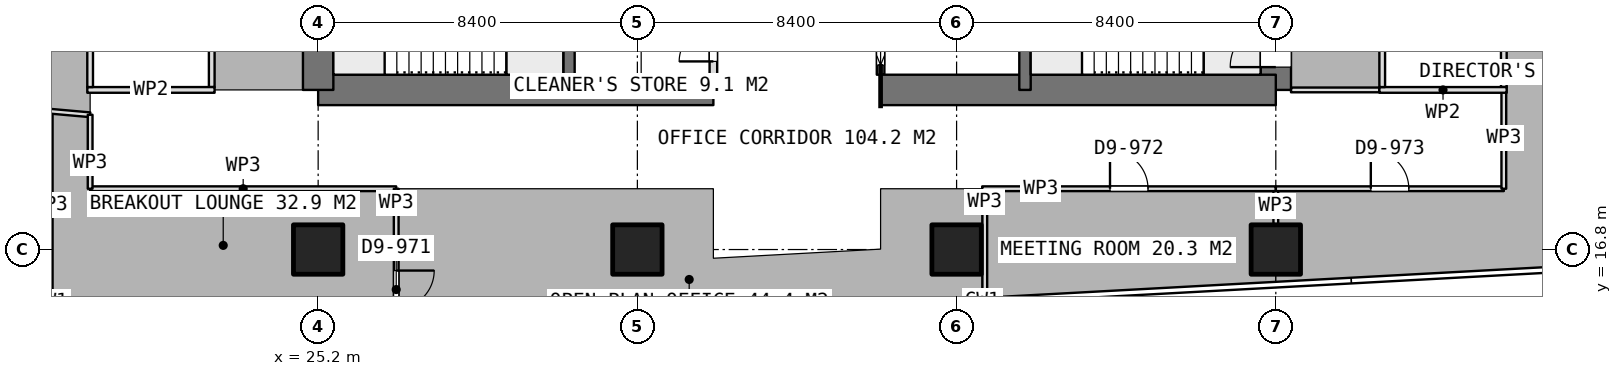
"""IFC4 building model, lengths in metres.
Left out: names, types, materials, properties, quantities, classifications, styles, units other than length and angle.
Written with IfcOpenShell. Run it as: python <this file> out.ifc"""

import sys

from ifc_helpers import new_model, si_unit, direction, frame, frame_2d, origin, origin_2d, place, context, subcontext, project, spatial, rectangle, extrude, element, fill, save


model = new_model("IFC4")
c1 = context("Model", 3, precision=1e-05, world=origin(), true_north=direction((0.0, 1.0)))
c2 = subcontext(c1, "Body", "Model", "MODEL_VIEW")
j1 = project(units=[si_unit("LENGTHUNIT", "METRE"), si_unit("PLANEANGLEUNIT", "RADIAN")], contexts=[c1])
p1 = place(None, origin())
s1 = spatial("IfcSite", under=j1, at=p1, CompositionType="ELEMENT")
p2 = place(p1, origin())
s2 = spatial("IfcBuilding", under=s1, at=p2, CompositionType="ELEMENT")
p3 = place(p2, frame((0.0, 0.0, 261.35)))
s3 = spatial("IfcBuildingStorey", under=s2, at=p3, CompositionType="ELEMENT", Elevation=261.35)
p4 = place(p3, frame((25.2, 21.0, 0.0), z_axis=(0.0, 0.0, 1.0), x_axis=(1.0, 0.0, 0.0)))
e1 = element("IfcWall", 1, at=p4, inside=s3, PredefinedType="SHEAR", context=c2, shape_type="SweptSolid", body=[
    extrude(rectangle(XDim=10.4, YDim=0.8, at=frame_2d((5.2, 0.0))), origin(), (0.0, 0.0, 1.0), 3.75),
])
p5 = place(p3, frame((40.0, 21.0, 0.0), z_axis=(0.0, 0.0, 1.0), x_axis=(1.0, 0.0, 0.0)))
e2 = element("IfcWall", 2, at=p5, inside=s3, PredefinedType="SHEAR", context=c2, shape_type="SweptSolid", body=[
    extrude(rectangle(XDim=10.4, YDim=0.8, at=frame_2d((5.2, 0.0))), origin(), (0.0, 0.0, 1.0), 3.75),
])
p6 = place(p3, frame((25.2, 21.0, 0.0), z_axis=(0.0, 0.0, 1.0), x_axis=(0.0, 1.0, 0.0)))
e3 = element("IfcWall", 3, at=p6, inside=s3, PredefinedType="SHEAR", context=c2, shape_type="SweptSolid", body=[
    extrude(rectangle(XDim=25.2, YDim=0.8, at=frame_2d((12.6, 0.0))), origin(), (0.0, 0.0, 1.0), 3.75),
])
p7 = place(p6, frame((7.8, 0.0, 0.0)))
e4 = element("IfcOpeningElement", 4, at=p7, cuts=e3, PredefinedType="OPENING", context=c2, shape_type="SweptSolid", body=[
    extrude(rectangle(XDim=1.2, YDim=2.1, at=frame_2d((0.6, 1.05))), frame((0.0, 0.41, 0.0), z_axis=(0.0, -1.0, 0.0), x_axis=(1.0, 0.0, 0.0)), (0.0, 0.0, 1.0), 0.82),
])
p8 = place(p6, frame((14.25, 0.0, 0.0)))
e5 = element("IfcOpeningElement", 5, at=p8, cuts=e3, PredefinedType="OPENING", context=c2, shape_type="SweptSolid", body=[
    extrude(rectangle(XDim=0.9, YDim=2.1, at=frame_2d((0.45, 1.05))), frame((0.0, 0.41, 0.0), z_axis=(0.0, -1.0, 0.0), x_axis=(1.0, 0.0, 0.0)), (0.0, 0.0, 1.0), 0.82),
])
p9 = place(p6, frame((16.85, 0.0, 0.0)))
e6 = element("IfcOpeningElement", 6, at=p9, cuts=e3, PredefinedType="OPENING", context=c2, shape_type="SweptSolid", body=[
    extrude(rectangle(XDim=0.9, YDim=2.1, at=frame_2d((0.45, 1.05))), frame((0.0, 0.41, 0.0), z_axis=(0.0, -1.0, 0.0), x_axis=(1.0, 0.0, 0.0)), (0.0, 0.0, 1.0), 0.82),
])
p10 = place(p6, frame((18.95, 0.0, 0.0)))
e7 = element("IfcOpeningElement", 7, at=p10, cuts=e3, PredefinedType="OPENING", context=c2, shape_type="SweptSolid", body=[
    extrude(rectangle(XDim=1.2, YDim=2.1, at=frame_2d((0.6, 1.05))), frame((0.0, 0.41, 0.0), z_axis=(0.0, -1.0, 0.0), x_axis=(1.0, 0.0, 0.0)), (0.0, 0.0, 1.0), 0.82),
])
p11 = place(p3, frame((50.4, 21.0, 0.0), z_axis=(0.0, 0.0, 1.0), x_axis=(0.0, 1.0, 0.0)))
e8 = element("IfcWall", 8, at=p11, inside=s3, PredefinedType="SHEAR", context=c2, shape_type="SweptSolid", body=[
    extrude(rectangle(XDim=25.2, YDim=0.8, at=frame_2d((12.6, 0.0))), origin(), (0.0, 0.0, 1.0), 3.75),
])
p12 = place(p11, frame((16.2, 0.0, 0.0)))
e9 = element("IfcOpeningElement", 9, at=p12, cuts=e8, PredefinedType="OPENING", context=c2, shape_type="SweptSolid", body=[
    extrude(rectangle(XDim=1.2, YDim=2.1, at=frame_2d((0.6, 1.05))), frame((0.0, 0.41, 0.0), z_axis=(0.0, -1.0, 0.0), x_axis=(1.0, 0.0, 0.0)), (0.0, 0.0, 1.0), 0.82),
])
p13 = place(p11, frame((10.05, 0.0, 0.0)))
e10 = element("IfcOpeningElement", 10, at=p13, cuts=e8, PredefinedType="OPENING", context=c2, shape_type="SweptSolid", body=[
    extrude(rectangle(XDim=0.9, YDim=2.1, at=frame_2d((0.45, 1.05))), frame((0.0, 0.41, 0.0), z_axis=(0.0, -1.0, 0.0), x_axis=(1.0, 0.0, 0.0)), (0.0, 0.0, 1.0), 0.82),
])
p14 = place(p11, frame((7.45, 0.0, 0.0)))
e11 = element("IfcOpeningElement", 11, at=p14, cuts=e8, PredefinedType="OPENING", context=c2, shape_type="SweptSolid", body=[
    extrude(rectangle(XDim=0.9, YDim=2.1, at=frame_2d((0.45, 1.05))), frame((0.0, 0.41, 0.0), z_axis=(0.0, -1.0, 0.0), x_axis=(1.0, 0.0, 0.0)), (0.0, 0.0, 1.0), 0.82),
])
p15 = place(p11, frame((0.6, 0.0, 0.0)))
e12 = element("IfcOpeningElement", 12, at=p15, cuts=e8, PredefinedType="OPENING", context=c2, shape_type="SweptSolid", body=[
    extrude(rectangle(XDim=1.2, YDim=2.1, at=frame_2d((0.6, 1.05))), frame((0.0, 0.41, 0.0), z_axis=(0.0, -1.0, 0.0), x_axis=(1.0, 0.0, 0.0)), (0.0, 0.0, 1.0), 0.82),
])
for number, where, z_axis, x_axis in (
    (13, (31.8, 21.0, 0.0), (0.0, 0.0, 1.0), (0.0, 1.0, 0.0)),
    (14, (43.8, 21.0, 0.0), (0.0, 0.0, 1.0), (0.0, 1.0, 0.0)),
):
    element("IfcWall", number, at=place(p3, frame(where, z_axis=z_axis, x_axis=x_axis)), inside=s3, PredefinedType="SHEAR", context=c2, shape_type="SweptSolid", body=[
        extrude(rectangle(XDim=25.2, YDim=0.3, at=frame_2d((12.6, 0.0))), origin(), (0.0, 0.0, 1.0), 3.75),
    ])
for number, where, z_axis, x_axis in (
    (15, (25.2, 16.8, 0.0), (0.0, 0.0, 1.0), (1.0, 0.0, 0.0)),
    (16, (33.6, 16.8, 0.0), (0.0, 0.0, 1.0), (1.0, 0.0, 0.0)),
    (17, (42.0, 16.8, 0.0), (0.0, 0.0, 1.0), (1.0, 0.0, 0.0)),
    (18, (50.4, 16.8, 0.0), (0.0, 0.0, 1.0), (1.0, 0.0, 0.0)),
):
    element("IfcColumn", number, at=place(p3, frame(where, z_axis=z_axis, x_axis=x_axis)), inside=s3, PredefinedType="COLUMN", context=c2, shape_type="SweptSolid", body=[
        extrude(rectangle(XDim=1.3, YDim=1.3, at=origin_2d()), origin(), (0.0, 0.0, 1.0), 3.75),
    ])
p16 = place(p3, frame((40.0, 21.4, 0.0), z_axis=(0.0, 0.0, 1.0), x_axis=(0.0, 1.0, 0.0)))
e19 = element("IfcWall", 19, at=p16, inside=s3, PredefinedType="PARTITIONING", context=c2, shape_type="SweptSolid", body=[
    extrude(rectangle(XDim=1.85, YDim=0.2, at=frame_2d((0.925, 0.0))), origin(), (0.0, 0.0, 1.0), 3.5),
])
p17 = place(p16, frame((0.25, 0.0, 0.0)))
e20 = element("IfcOpeningElement", 20, at=p17, cuts=e19, PredefinedType="OPENING", context=c2, shape_type="SweptSolid", body=[
    extrude(rectangle(XDim=1.1, YDim=2.1, at=frame_2d((0.55, 1.05))), frame((0.0, 0.11, 0.0), z_axis=(0.0, -1.0, 0.0), x_axis=(1.0, 0.0, 0.0)), (0.0, 0.0, 1.0), 0.22),
])
p18 = place(p3, frame((35.6, 21.4, 0.0), z_axis=(0.0, 0.0, 1.0), x_axis=(0.0, 1.0, 0.0)))
e21 = element("IfcWall", 21, at=p18, inside=s3, PredefinedType="PARTITIONING", context=c2, shape_type="SweptSolid", body=[
    extrude(rectangle(XDim=1.85, YDim=0.2, at=frame_2d((0.925, 0.0))), origin(), (0.0, 0.0, 1.0), 3.5),
])
p19 = place(p18, frame((0.35, 0.0, 0.0)))
e22 = element("IfcOpeningElement", 22, at=p19, cuts=e21, PredefinedType="OPENING", context=c2, shape_type="SweptSolid", body=[
    extrude(rectangle(XDim=0.9, YDim=2.1, at=frame_2d((0.45, 1.05))), frame((0.0, 0.11, 0.0), z_axis=(0.0, -1.0, 0.0), x_axis=(1.0, 0.0, 0.0)), (0.0, 0.0, 1.0), 0.22),
])
p20 = place(p3, frame((19.125, 21.0, 0.0), z_axis=(0.0, 0.0, 1.0), x_axis=(1.0, 0.0, 0.0)))
e23 = element("IfcWall", 23, at=p20, inside=s3, PredefinedType="PARTITIONING", context=c2, shape_type="SweptSolid", body=[
    extrude(rectangle(XDim=3.35, YDim=0.15, at=frame_2d((1.675, 0.0))), origin(), (0.0, 0.0, 1.0), 3.5),
])
p21 = place(p3, frame((19.2, 21.075, 0.0), z_axis=(0.0, 0.0, 1.0), x_axis=(0.0, 1.0, 0.0)))
e24 = element("IfcWall", 24, at=p21, inside=s3, PredefinedType="PARTITIONING", context=c2, shape_type="SweptSolid", body=[
    extrude(rectangle(XDim=6.85, YDim=0.15, at=frame_2d((3.425, 0.0))), origin(), (0.0, 0.0, 1.0), 3.5),
])
p22 = place(p3, frame((22.4, 21.075, 0.0), z_axis=(0.0, 0.0, 1.0), x_axis=(0.0, 1.0, 0.0)))
e25 = element("IfcWall", 25, at=p22, inside=s3, PredefinedType="PARTITIONING", context=c2, shape_type="SweptSolid", body=[
    extrude(rectangle(XDim=6.85, YDim=0.15, at=frame_2d((3.425, 0.0))), origin(), (0.0, 0.0, 1.0), 3.5),
])
p23 = place(p22, frame((2.925, 0.0, 0.0)))
e26 = element("IfcOpeningElement", 26, at=p23, cuts=e25, PredefinedType="OPENING", context=c2, shape_type="SweptSolid", body=[
    extrude(rectangle(XDim=1.0, YDim=2.1, at=frame_2d((0.5, 1.05))), frame((0.0, 0.085, 0.0), z_axis=(0.0, -1.0, 0.0), x_axis=(1.0, 0.0, 0.0)), (0.0, 0.0, 1.0), 0.17),
])
p24 = place(p3, frame((53.125, 21.0, 0.0), z_axis=(0.0, 0.0, 1.0), x_axis=(1.0, 0.0, 0.0)))
e27 = element("IfcWall", 27, at=p24, inside=s3, PredefinedType="PARTITIONING", context=c2, shape_type="SweptSolid", body=[
    extrude(rectangle(XDim=3.35, YDim=0.15, at=frame_2d((1.675, 0.0))), origin(), (0.0, 0.0, 1.0), 3.5),
])
p25 = place(p3, frame((53.2, 21.075, 0.0), z_axis=(0.0, 0.0, 1.0), x_axis=(0.0, 1.0, 0.0)))
e28 = element("IfcWall", 28, at=p25, inside=s3, PredefinedType="PARTITIONING", context=c2, shape_type="SweptSolid", body=[
    extrude(rectangle(XDim=6.85, YDim=0.15, at=frame_2d((3.425, 0.0))), origin(), (0.0, 0.0, 1.0), 3.5),
])
p26 = place(p25, frame((2.925, 0.0, 0.0)))
e29 = element("IfcOpeningElement", 29, at=p26, cuts=e28, PredefinedType="OPENING", context=c2, shape_type="SweptSolid", body=[
    extrude(rectangle(XDim=1.0, YDim=2.1, at=frame_2d((0.5, 1.05))), frame((0.0, 0.085, 0.0), z_axis=(0.0, -1.0, 0.0), x_axis=(1.0, 0.0, 0.0)), (0.0, 0.0, 1.0), 0.17),
])
p27 = place(p3, frame((56.4, 21.075, 0.0), z_axis=(0.0, 0.0, 1.0), x_axis=(0.0, 1.0, 0.0)))
e30 = element("IfcWall", 30, at=p27, inside=s3, PredefinedType="PARTITIONING", context=c2, shape_type="SweptSolid", body=[
    extrude(rectangle(XDim=6.85, YDim=0.15, at=frame_2d((3.425, 0.0))), origin(), (0.0, 0.0, 1.0), 3.5),
])
p28 = place(p3, frame((50.4, 18.4, 0.0), z_axis=(0.0, 0.0, 1.0), x_axis=(0.0, -1.0, 0.0)))
e31 = element("IfcWall", 31, at=p28, inside=s3, PredefinedType="PARTITIONING", context=c2, shape_type="SweptSolid", body=[
    extrude(rectangle(XDim=0.93, YDim=0.125, at=frame_2d((0.465, 0.0))), origin(), (0.0, 0.0, 1.0), 3.5),
])
p29 = place(p3, frame((42.742, 15.538, 0.0), z_axis=(0.0, 0.0, 1.0), x_axis=(0.0, 1.0, 0.0)))
e32 = element("IfcWall", 32, at=p29, inside=s3, PredefinedType="PARTITIONING", context=c2, shape_type="SweptSolid", body=[
    extrude(rectangle(XDim=2.799, YDim=0.125, at=frame_2d((1.399, 0.0))), origin(), (0.0, 0.0, 1.0), 3.5),
])
p30 = place(p3, frame((42.674, 18.4, 0.0), z_axis=(0.0, 0.0, 1.0), x_axis=(1.0, 0.0, 0.0)))
e33 = element("IfcWall", 33, at=p30, inside=s3, PredefinedType="PARTITIONING", context=c2, shape_type="SweptSolid", body=[
    extrude(rectangle(XDim=7.726, YDim=0.125, at=frame_2d((3.863, 0.0))), origin(), (0.0, 0.0, 1.0), 3.5),
])
p31 = place(p30, frame((3.363, 0.0, 0.0)))
e34 = element("IfcOpeningElement", 34, at=p31, cuts=e33, PredefinedType="OPENING", context=c2, shape_type="SweptSolid", body=[
    extrude(rectangle(XDim=1.0, YDim=2.1, at=frame_2d((0.5, 1.05))), frame((0.0, 0.073, 0.0), z_axis=(0.0, -1.0, 0.0), x_axis=(1.0, 0.0, 0.0)), (0.0, 0.0, 1.0), 0.145),
])
p32 = place(p3, frame((50.401, 18.4, 0.0), z_axis=(0.0, 0.0, 1.0), x_axis=(1.0, 0.0, 0.0)))
e35 = element("IfcWall", 35, at=p32, inside=s3, PredefinedType="PARTITIONING", context=c2, shape_type="SweptSolid", body=[
    extrude(rectangle(XDim=5.999, YDim=0.125, at=frame_2d((3.0, 0.0))), origin(), (0.0, 0.0, 1.0), 3.5),
])
p33 = place(p32, frame((2.499, 0.0, 0.0)))
e36 = element("IfcOpeningElement", 36, at=p33, cuts=e35, PredefinedType="OPENING", context=c2, shape_type="SweptSolid", body=[
    extrude(rectangle(XDim=1.0, YDim=2.1, at=frame_2d((0.5, 1.05))), frame((0.0, 0.073, 0.0), z_axis=(0.0, -1.0, 0.0), x_axis=(1.0, 0.0, 0.0)), (0.0, 0.0, 1.0), 0.145),
])
p34 = place(p3, frame((56.4, 18.4, 0.0), z_axis=(0.0, 0.0, 1.0), x_axis=(0.0, 1.0, 0.0)))
e37 = element("IfcWall", 37, at=p34, inside=s3, PredefinedType="PARTITIONING", context=c2, shape_type="SweptSolid", body=[
    extrude(rectangle(XDim=2.675, YDim=0.125, at=frame_2d((1.337, 0.0))), origin(), (0.0, 0.0, 1.0), 3.5),
])
p35 = place(p3, frame((53.124, 21.0, 0.0), z_axis=(0.0, 0.0, 1.0), x_axis=(-1.0, 0.0, 0.0)))
e38 = element("IfcWall", 38, at=p35, inside=s3, PredefinedType="PARTITIONING", context=c2, shape_type="SweptSolid", body=[
    extrude(rectangle(XDim=2.324, YDim=0.125, at=frame_2d((1.162, 0.0))), origin(), (0.0, 0.0, 1.0), 3.5),
])
p36 = place(p3, frame((18.149, 20.439, 0.0), z_axis=(0.0, 0.0, 1.0), x_axis=(0.0, -1.0, 0.0)))
e39 = element("IfcWall", 39, at=p36, inside=s3, PredefinedType="PARTITIONING", context=c2, shape_type="SweptSolid", body=[
    extrude(rectangle(XDim=4.939, YDim=0.125, at=frame_2d((2.469, 0.0))), origin(), (0.0, 0.0, 1.0), 3.5),
])
p37 = place(p3, frame((19.2, 18.4, 0.0), z_axis=(0.0, 0.0, 1.0), x_axis=(1.0, 0.0, 0.0)))
e40 = element("IfcWall", 40, at=p37, inside=s3, PredefinedType="PARTITIONING", context=c2, shape_type="SweptSolid", body=[
    extrude(rectangle(XDim=8.054, YDim=0.125, at=frame_2d((4.027, 0.0))), origin(), (0.0, 0.0, 1.0), 3.5),
])
p38 = place(p3, frame((27.254, 18.4, 0.0), z_axis=(0.0, 0.0, 1.0), x_axis=(0.0, -1.0, 0.0)))
e41 = element("IfcWall", 41, at=p38, inside=s3, PredefinedType="PARTITIONING", context=c2, shape_type="SweptSolid", body=[
    extrude(rectangle(XDim=3.705, YDim=0.125, at=frame_2d((1.853, 0.0))), origin(), (0.0, 0.0, 1.0), 3.5),
])
p39 = place(p38, frame((2.153, 0.0, 0.0)))
e42 = element("IfcOpeningElement", 42, at=p39, cuts=e41, PredefinedType="OPENING", context=c2, shape_type="SweptSolid", body=[
    extrude(rectangle(XDim=1.0, YDim=2.1, at=frame_2d((0.5, 1.05))), frame((0.0, 0.073, 0.0), z_axis=(0.0, -1.0, 0.0), x_axis=(1.0, 0.0, 0.0)), (0.0, 0.0, 1.0), 0.145),
])
p40 = place(p3, frame((18.15, 20.439, 0.0), z_axis=(0.0, 0.0, 1.0), x_axis=(0.996099374617, -0.088238517026, 0.0)))
e43 = element("IfcWall", 43, at=p40, inside=s3, PredefinedType="PARTITIONING", context=c2, shape_type="SweptSolid", body=[
    extrude(rectangle(XDim=1.054, YDim=0.125, at=frame_2d((0.527, 0.0))), origin(), (0.0, 0.0, 1.0), 3.5),
])
p41 = place(p3, frame((19.2, 20.346, 0.0), z_axis=(0.0, 0.0, 1.0), x_axis=(0.0, -1.0, 0.0)))
e44 = element("IfcWall", 44, at=p41, inside=s3, PredefinedType="PARTITIONING", context=c2, shape_type="SweptSolid", body=[
    extrude(rectangle(XDim=1.946, YDim=0.125, at=frame_2d((0.973, 0.0))), origin(), (0.0, 0.0, 1.0), 3.5),
])
p42 = place(p17, origin())
e45 = element("IfcDoor", 45, at=p42, inside=s3, OperationType="SLIDING_TO_LEFT", PredefinedType="DOOR", context=c2, shape_type="SweptSolid", body=[
    extrude(rectangle(XDim=1.1, YDim=2.1, at=frame_2d((0.55, 1.05))), frame((0.0, 0.025, 0.0), z_axis=(0.0, -1.0, 0.0), x_axis=(1.0, 0.0, 0.0)), (0.0, 0.0, 1.0), 0.05),
])
fill(e20, e45)
p43 = place(p19, origin())
e46 = element("IfcDoor", 46, at=p43, inside=s3, OperationType="SINGLE_SWING_LEFT", PredefinedType="DOOR", context=c2, shape_type="SweptSolid", body=[
    extrude(rectangle(XDim=0.9, YDim=2.1, at=frame_2d((0.45, 1.05))), frame((0.0, 0.025, 0.0), z_axis=(0.0, -1.0, 0.0), x_axis=(1.0, 0.0, 0.0)), (0.0, 0.0, 1.0), 0.05),
])
fill(e22, e46)
p44 = place(p31, origin())
e47 = element("IfcDoor", 47, at=p44, inside=s3, OperationType="SINGLE_SWING_LEFT", PredefinedType="DOOR", context=c2, shape_type="SweptSolid", body=[
    extrude(rectangle(XDim=1.0, YDim=2.1, at=frame_2d((0.5, 1.05))), frame((0.0, 0.025, 0.0), z_axis=(0.0, -1.0, 0.0), x_axis=(1.0, 0.0, 0.0)), (0.0, 0.0, 1.0), 0.05),
])
fill(e34, e47)
p45 = place(p33, origin())
e48 = element("IfcDoor", 48, at=p45, inside=s3, OperationType="SINGLE_SWING_LEFT", PredefinedType="DOOR", context=c2, shape_type="SweptSolid", body=[
    extrude(rectangle(XDim=1.0, YDim=2.1, at=frame_2d((0.5, 1.05))), frame((0.0, 0.025, 0.0), z_axis=(0.0, -1.0, 0.0), x_axis=(1.0, 0.0, 0.0)), (0.0, 0.0, 1.0), 0.05),
])
fill(e36, e48)
p46 = place(p39, origin())
e49 = element("IfcDoor", 49, at=p46, inside=s3, OperationType="SINGLE_SWING_LEFT", PredefinedType="DOOR", context=c2, shape_type="SweptSolid", body=[
    extrude(rectangle(XDim=1.0, YDim=2.1, at=frame_2d((0.5, 1.05))), frame((0.0, 0.025, 0.0), z_axis=(0.0, -1.0, 0.0), x_axis=(1.0, 0.0, 0.0)), (0.0, 0.0, 1.0), 0.05),
])
fill(e42, e49)
p47 = place(p15, origin())
e50 = element("IfcDoor", 50, at=p47, inside=s3, OperationType="SINGLE_SWING_RIGHT", PredefinedType="DOOR", context=c2, shape_type="SweptSolid", body=[
    extrude(rectangle(XDim=1.2, YDim=2.1, at=frame_2d((0.6, 1.05))), frame((0.0, 0.025, 0.0), z_axis=(0.0, -1.0, 0.0), x_axis=(1.0, 0.0, 0.0)), (0.0, 0.0, 1.0), 0.05),
])
fill(e12, e50)
save(model, sys.argv[1])
